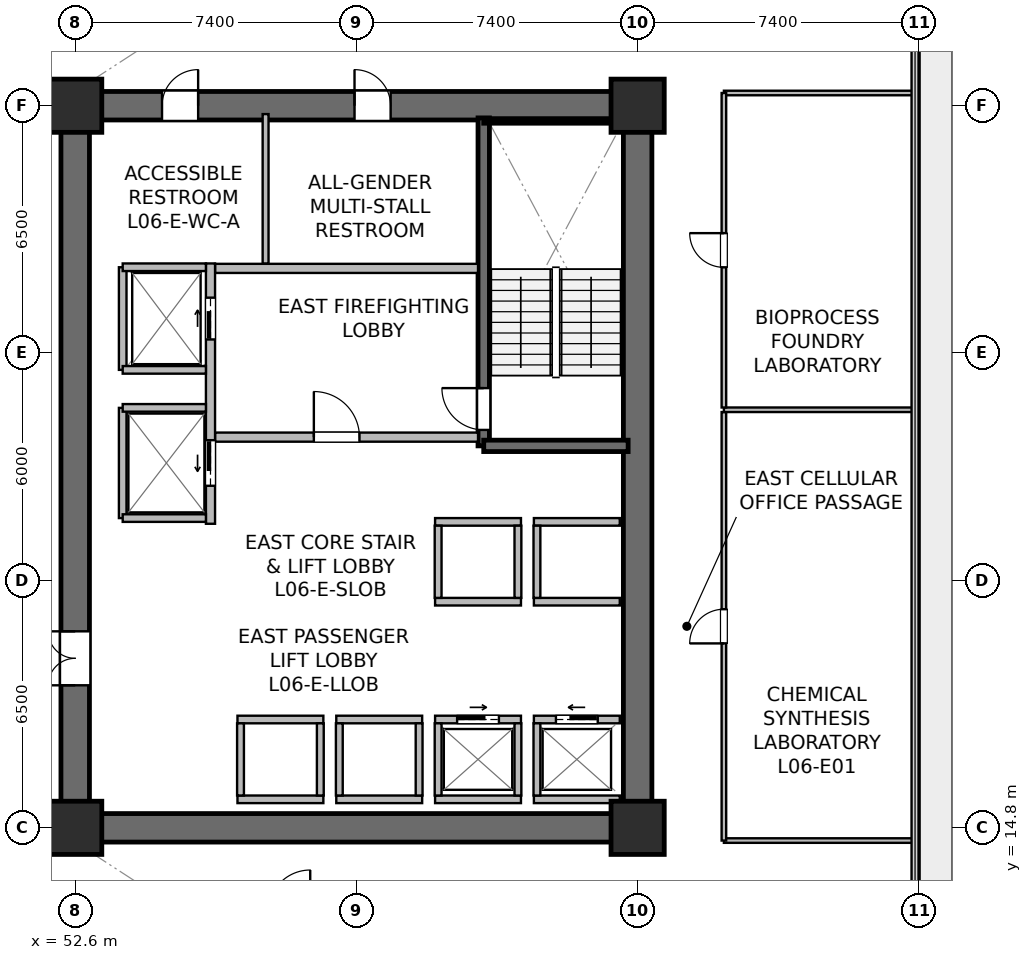
"""IFC4 building model, lengths in metres.
Left out: names, types, materials, properties, quantities, classifications, styles, units other than length and angle.
Written with IfcOpenShell. Run it as: python <this file> out.ifc"""

import sys

from ifc_helpers import new_model, si_unit, direction, frame, frame_2d, origin, origin_2d, place, context, subcontext, project, spatial, rectangle, extrude, source, transform, mapped, element, fill, save


model = new_model("IFC4")
c1 = context("Model", 3, precision=1e-05, world=origin(), true_north=direction((0.0, 1.0)))
c2 = subcontext(c1, "Body", "Model", "MODEL_VIEW")
j1 = project(units=[si_unit("LENGTHUNIT", "METRE"), si_unit("PLANEANGLEUNIT", "RADIAN")], contexts=[c1])
p1 = place(None, origin())
s1 = spatial("IfcSite", under=j1, at=p1, CompositionType="ELEMENT")
p2 = place(p1, origin())
s2 = spatial("IfcBuilding", under=s1, at=p2, CompositionType="ELEMENT")
p3 = place(p2, frame((0.0, 0.0, 25.2)))
s3 = spatial("IfcBuildingStorey", under=s2, at=p3, CompositionType="ELEMENT", Elevation=25.2)
p4 = place(p3, frame((52.225, 14.8, 0.0), z_axis=(0.0, 0.0, 1.0), x_axis=(1.0, 0.0, 0.0)))
e1 = element("IfcWall", 1, at=p4, inside=s3, PredefinedType="SHEAR", context=c2, shape_type="SweptSolid", body=[
    extrude(rectangle(XDim=15.55, YDim=0.75, at=frame_2d((7.775, 0.0))), origin(), (0.0, 0.0, 1.0), 3.78),
])
p5 = place(p3, frame((52.225, 33.8, 0.0), z_axis=(0.0, 0.0, 1.0), x_axis=(1.0, 0.0, 0.0)))
e2 = element("IfcWall", 2, at=p5, inside=s3, PredefinedType="SHEAR", context=c2, shape_type="SweptSolid", body=[
    extrude(rectangle(XDim=15.55, YDim=0.75, at=frame_2d((7.775, 0.0))), origin(), (0.0, 0.0, 1.0), 3.78),
])
p6 = place(p5, frame((7.725, 0.0, 0.0)))
e3 = element("IfcOpeningElement", 3, at=p6, cuts=e2, PredefinedType="OPENING", context=c2, shape_type="SweptSolid", body=[
    extrude(rectangle(XDim=0.95, YDim=2.15, at=frame_2d((0.475, 1.075))), frame((0.0, 0.385, 0.0), z_axis=(0.0, -1.0, 0.0), x_axis=(1.0, 0.0, 0.0)), (0.0, 0.0, 1.0), 0.77),
])
p7 = place(p5, frame((2.66, 0.0, 0.0)))
e4 = element("IfcOpeningElement", 4, at=p7, cuts=e2, PredefinedType="OPENING", context=c2, shape_type="SweptSolid", body=[
    extrude(rectangle(XDim=0.95, YDim=2.15, at=frame_2d((0.475, 1.075))), frame((0.0, 0.385, 0.0), z_axis=(0.0, -1.0, 0.0), x_axis=(1.0, 0.0, 0.0)), (0.0, 0.0, 1.0), 0.77),
])
p8 = place(p3, frame((52.6, 15.175, 0.0), z_axis=(0.0, 0.0, 1.0), x_axis=(0.0, 1.0, 0.0)))
e5 = element("IfcWall", 5, at=p8, inside=s3, PredefinedType="SHEAR", context=c2, shape_type="SweptSolid", body=[
    extrude(rectangle(XDim=18.25, YDim=0.75, at=frame_2d((9.125, 0.0))), origin(), (0.0, 0.0, 1.0), 3.78),
])
p9 = place(p8, frame((3.375, 0.0, 0.0)))
e6 = element("IfcOpeningElement", 6, at=p9, cuts=e5, PredefinedType="OPENING", context=c2, shape_type="SweptSolid", body=[
    extrude(rectangle(XDim=1.42, YDim=2.2, at=frame_2d((0.71, 1.1))), frame((0.0, 0.385, 0.0), z_axis=(0.0, -1.0, 0.0), x_axis=(1.0, 0.0, 0.0)), (0.0, 0.0, 1.0), 0.77),
])
p10 = place(p3, frame((67.4, 15.175, 0.0), z_axis=(0.0, 0.0, 1.0), x_axis=(0.0, 1.0, 0.0)))
e7 = element("IfcWall", 7, at=p10, inside=s3, PredefinedType="SHEAR", context=c2, shape_type="SweptSolid", body=[
    extrude(rectangle(XDim=18.25, YDim=0.75, at=frame_2d((9.125, 0.0))), origin(), (0.0, 0.0, 1.0), 3.78),
])
p11 = place(p3, frame((63.35, 24.85, 0.0), z_axis=(0.0, 0.0, 1.0), x_axis=(0.0, 1.0, 0.0)))
e8 = element("IfcWall", 8, at=p11, inside=s3, PredefinedType="SHEAR", context=c2, shape_type="SweptSolid", body=[
    extrude(rectangle(XDim=8.63, YDim=0.3, at=frame_2d((4.315, 0.0))), origin(), (0.0, 0.0, 1.0), 3.78),
])
p12 = place(p11, frame((0.42, 0.0, 0.0)))
e9 = element("IfcOpeningElement", 9, at=p12, cuts=e8, PredefinedType="OPENING", context=c2, shape_type="SweptSolid", body=[
    extrude(rectangle(XDim=1.1, YDim=2.15, at=frame_2d((0.55, 1.075))), frame((0.0, 0.16, 0.0), z_axis=(0.0, -1.0, 0.0), x_axis=(1.0, 0.0, 0.0)), (0.0, 0.0, 1.0), 0.32),
])
p13 = place(p3, frame((63.35, 24.85, 0.0), z_axis=(0.0, 0.0, 1.0), x_axis=(1.0, 0.0, 0.0)))
e10 = element("IfcWall", 10, at=p13, inside=s3, PredefinedType="SHEAR", context=c2, shape_type="SweptSolid", body=[
    extrude(rectangle(XDim=3.8, YDim=0.3, at=frame_2d((1.9, 0.0))), origin(), (0.0, 0.0, 1.0), 3.78),
])
p14 = place(p3, frame((63.35, 33.4, 0.0), z_axis=(0.0, 0.0, 1.0), x_axis=(1.0, 0.0, 0.0)))
e11 = element("IfcWall", 11, at=p14, inside=s3, PredefinedType="SOLIDWALL", context=c2, shape_type="SweptSolid", body=[
    extrude(rectangle(XDim=3.72, YDim=0.12, at=frame_2d((1.86, 0.0))), origin(), (0.0, 0.0, 1.0), 3.78),
])
m1 = source(origin(), c2, "Body", "SweptSolid", [
    extrude(rectangle(XDim=1.4, YDim=1.4, at=origin_2d()), origin(), (0.0, 0.0, 1.0), 4.1),
])
for number, where, z_axis, x_axis in (
    (12, (52.6, 14.8, 0.0), (0.0, 0.0, 1.0), (1.0, 0.0, 0.0)),
    (13, (67.4, 14.8, 0.0), (0.0, 0.0, 1.0), (1.0, 0.0, 0.0)),
    (14, (52.6, 33.8, 0.0), (0.0, 0.0, 1.0), (1.0, 0.0, 0.0)),
    (15, (67.4, 33.8, 0.0), (0.0, 0.0, 1.0), (1.0, 0.0, 0.0)),
):
    element("IfcColumn", number, at=place(p3, frame(where, z_axis=z_axis, x_axis=x_axis)), inside=s3, PredefinedType="COLUMN", context=c2, shape_type="MappedRepresentation", body=[
        mapped(m1, transform((0.0, 0.0, 0.0), scale=1.0)),
    ])
p15 = place(p3, frame((56.28, 25.08, 0.0), z_axis=(0.0, 0.0, 1.0), x_axis=(1.0, 0.0, 0.0)))
e16 = element("IfcWall", 16, at=p15, inside=s3, PredefinedType="SOLIDWALL", context=c2, shape_type="SweptSolid", body=[
    extrude(rectangle(XDim=6.92, YDim=0.24, at=frame_2d((3.46, 0.0))), origin(), (0.0, 0.0, 1.0), 3.065),
])
p16 = place(p15, frame((2.6, 0.0, 0.0)))
e17 = element("IfcOpeningElement", 17, at=p16, cuts=e16, PredefinedType="OPENING", context=c2, shape_type="SweptSolid", body=[
    extrude(rectangle(XDim=1.2, YDim=2.16, at=frame_2d((0.6, 1.08))), frame((0.0, 0.13, 0.0), z_axis=(0.0, -1.0, 0.0), x_axis=(1.0, 0.0, 0.0)), (0.0, 0.0, 1.0), 0.26),
])
p17 = place(p3, frame((56.28, 29.52, 0.0), z_axis=(0.0, 0.0, 1.0), x_axis=(1.0, 0.0, 0.0)))
e18 = element("IfcWall", 18, at=p17, inside=s3, PredefinedType="SOLIDWALL", context=c2, shape_type="SweptSolid", body=[
    extrude(rectangle(XDim=6.92, YDim=0.24, at=frame_2d((3.46, 0.0))), origin(), (0.0, 0.0, 1.0), 3.065),
])
p18 = place(p3, frame((56.16, 22.8, 0.0), z_axis=(0.0, 0.0, 1.0), x_axis=(0.0, 1.0, 0.0)))
e19 = element("IfcWall", 19, at=p18, inside=s3, PredefinedType="SOLIDWALL", context=c2, shape_type="SweptSolid", body=[
    extrude(rectangle(XDim=6.85, YDim=0.24, at=frame_2d((3.425, 0.0))), origin(), (0.0, 0.0, 1.0), 2.865),
])
p19 = place(p18, frame((4.85, 0.0, 0.0)))
e20 = element("IfcOpeningElement", 20, at=p19, cuts=e19, PredefinedType="OPENING", context=c2, shape_type="SweptSolid", body=[
    extrude(rectangle(XDim=1.1, YDim=2.22, at=frame_2d((0.55, 1.11))), frame((0.0, 0.13, 0.0), z_axis=(0.0, -1.0, 0.0), x_axis=(1.0, 0.0, 0.0)), (0.0, 0.0, 1.0), 0.26),
])
p20 = place(p18, frame((1.0, 0.0, 0.0)))
e21 = element("IfcOpeningElement", 21, at=p20, cuts=e19, PredefinedType="OPENING", context=c2, shape_type="SweptSolid", body=[
    extrude(rectangle(XDim=1.2, YDim=2.22, at=frame_2d((0.6, 1.11))), frame((0.0, 0.13, 0.0), z_axis=(0.0, -1.0, 0.0), x_axis=(1.0, 0.0, 0.0)), (0.0, 0.0, 1.0), 0.26),
])
p21 = place(p3, frame((64.67, 17.65, 0.0), z_axis=(0.0, 0.0, 1.0), x_axis=(1.0, 0.0, 0.0)))
e22 = element("IfcWall", 22, at=p21, inside=s3, PredefinedType="SOLIDWALL", context=c2, shape_type="SweptSolid", body=[
    extrude(rectangle(XDim=2.26, YDim=0.2, at=frame_2d((1.13, 0.0))), origin(), (0.0, 0.0, 1.0), 3.78),
])
p22 = place(p21, frame((0.58, 0.0, 0.0)))
e23 = element("IfcOpeningElement", 23, at=p22, cuts=e22, PredefinedType="OPENING", context=c2, shape_type="SweptSolid", body=[
    extrude(rectangle(XDim=1.1, YDim=2.22, at=frame_2d((0.55, 1.11))), frame((0.0, 0.11, 0.0), z_axis=(0.0, -1.0, 0.0), x_axis=(1.0, 0.0, 0.0)), (0.0, 0.0, 1.0), 0.22),
])
p23 = place(p3, frame((64.67, 15.55, 0.0), z_axis=(0.0, 0.0, 1.0), x_axis=(1.0, 0.0, 0.0)))
e24 = element("IfcWall", 24, at=p23, inside=s3, PredefinedType="SOLIDWALL", context=c2, shape_type="SweptSolid", body=[
    extrude(rectangle(XDim=2.26, YDim=0.2, at=frame_2d((1.13, 0.0))), origin(), (0.0, 0.0, 1.0), 3.78),
])
p24 = place(p3, frame((64.75, 15.65, 0.0), z_axis=(0.0, 0.0, 1.0), x_axis=(0.0, 1.0, 0.0)))
e25 = element("IfcWall", 25, at=p24, inside=s3, PredefinedType="SOLIDWALL", context=c2, shape_type="SweptSolid", body=[
    extrude(rectangle(XDim=1.9, YDim=0.18, at=frame_2d((0.95, 0.0))), origin(), (0.0, 0.0, 1.0), 3.78),
])
p25 = place(p3, frame((62.07, 17.65, 0.0), z_axis=(0.0, 0.0, 1.0), x_axis=(1.0, 0.0, 0.0)))
e26 = element("IfcWall", 26, at=p25, inside=s3, PredefinedType="SOLIDWALL", context=c2, shape_type="SweptSolid", body=[
    extrude(rectangle(XDim=2.26, YDim=0.2, at=frame_2d((1.13, 0.0))), origin(), (0.0, 0.0, 1.0), 3.78),
])
p26 = place(p25, frame((0.58, 0.0, 0.0)))
e27 = element("IfcOpeningElement", 27, at=p26, cuts=e26, PredefinedType="OPENING", context=c2, shape_type="SweptSolid", body=[
    extrude(rectangle(XDim=1.1, YDim=2.22, at=frame_2d((0.55, 1.11))), frame((0.0, 0.11, 0.0), z_axis=(0.0, -1.0, 0.0), x_axis=(1.0, 0.0, 0.0)), (0.0, 0.0, 1.0), 0.22),
])
p27 = place(p3, frame((62.07, 15.55, 0.0), z_axis=(0.0, 0.0, 1.0), x_axis=(1.0, 0.0, 0.0)))
e28 = element("IfcWall", 28, at=p27, inside=s3, PredefinedType="SOLIDWALL", context=c2, shape_type="SweptSolid", body=[
    extrude(rectangle(XDim=2.26, YDim=0.2, at=frame_2d((1.13, 0.0))), origin(), (0.0, 0.0, 1.0), 3.78),
])
for number, where, z_axis, x_axis in (
    (29, (62.15, 15.65, 0.0), (0.0, 0.0, 1.0), (0.0, 1.0, 0.0)),
    (30, (64.25, 15.65, 0.0), (0.0, 0.0, 1.0), (0.0, 1.0, 0.0)),
):
    element("IfcWall", number, at=place(p3, frame(where, z_axis=z_axis, x_axis=x_axis)), inside=s3, PredefinedType="SOLIDWALL", context=c2, shape_type="SweptSolid", body=[
        extrude(rectangle(XDim=1.9, YDim=0.18, at=frame_2d((0.95, 0.0))), origin(), (0.0, 0.0, 1.0), 3.78),
    ])
for number, where, z_axis, x_axis in (
    (31, (59.47, 17.65, 0.0), (0.0, 0.0, 1.0), (1.0, 0.0, 0.0)),
    (32, (59.47, 15.55, 0.0), (0.0, 0.0, 1.0), (1.0, 0.0, 0.0)),
):
    element("IfcWall", number, at=place(p3, frame(where, z_axis=z_axis, x_axis=x_axis)), inside=s3, PredefinedType="SOLIDWALL", context=c2, shape_type="SweptSolid", body=[
        extrude(rectangle(XDim=2.26, YDim=0.2, at=frame_2d((1.13, 0.0))), origin(), (0.0, 0.0, 1.0), 3.065),
    ])
for number, where, z_axis, x_axis in (
    (33, (59.55, 15.65, 0.0), (0.0, 0.0, 1.0), (0.0, 1.0, 0.0)),
    (34, (61.65, 15.65, 0.0), (0.0, 0.0, 1.0), (0.0, 1.0, 0.0)),
):
    element("IfcWall", number, at=place(p3, frame(where, z_axis=z_axis, x_axis=x_axis)), inside=s3, PredefinedType="SOLIDWALL", context=c2, shape_type="SweptSolid", body=[
        extrude(rectangle(XDim=1.9, YDim=0.18, at=frame_2d((0.95, 0.0))), origin(), (0.0, 0.0, 1.0), 3.78),
    ])
for number, where, z_axis, x_axis in (
    (35, (56.87, 17.65, 0.0), (0.0, 0.0, 1.0), (1.0, 0.0, 0.0)),
    (36, (56.87, 15.55, 0.0), (0.0, 0.0, 1.0), (1.0, 0.0, 0.0)),
):
    element("IfcWall", number, at=place(p3, frame(where, z_axis=z_axis, x_axis=x_axis)), inside=s3, PredefinedType="SOLIDWALL", context=c2, shape_type="SweptSolid", body=[
        extrude(rectangle(XDim=2.26, YDim=0.2, at=frame_2d((1.13, 0.0))), origin(), (0.0, 0.0, 1.0), 3.78),
    ])
for number, where, z_axis, x_axis in (
    (37, (56.95, 15.65, 0.0), (0.0, 0.0, 1.0), (0.0, 1.0, 0.0)),
    (38, (59.05, 15.65, 0.0), (0.0, 0.0, 1.0), (0.0, 1.0, 0.0)),
):
    element("IfcWall", number, at=place(p3, frame(where, z_axis=z_axis, x_axis=x_axis)), inside=s3, PredefinedType="SOLIDWALL", context=c2, shape_type="SweptSolid", body=[
        extrude(rectangle(XDim=1.9, YDim=0.18, at=frame_2d((0.95, 0.0))), origin(), (0.0, 0.0, 1.0), 3.78),
    ])
for number, where, z_axis, x_axis in (
    (39, (64.67, 20.75, 0.0), (0.0, 0.0, 1.0), (1.0, 0.0, 0.0)),
    (40, (64.67, 22.85, 0.0), (0.0, 0.0, 1.0), (1.0, 0.0, 0.0)),
):
    element("IfcWall", number, at=place(p3, frame(where, z_axis=z_axis, x_axis=x_axis)), inside=s3, PredefinedType="SOLIDWALL", context=c2, shape_type="SweptSolid", body=[
        extrude(rectangle(XDim=2.26, YDim=0.2, at=frame_2d((1.13, 0.0))), origin(), (0.0, 0.0, 1.0), 3.78),
    ])
p28 = place(p3, frame((64.75, 20.85, 0.0), z_axis=(0.0, 0.0, 1.0), x_axis=(0.0, 1.0, 0.0)))
e41 = element("IfcWall", 41, at=p28, inside=s3, PredefinedType="SOLIDWALL", context=c2, shape_type="SweptSolid", body=[
    extrude(rectangle(XDim=1.9, YDim=0.18, at=frame_2d((0.95, 0.0))), origin(), (0.0, 0.0, 1.0), 3.78),
])
for number, where, z_axis, x_axis in (
    (42, (62.07, 20.75, 0.0), (0.0, 0.0, 1.0), (1.0, 0.0, 0.0)),
    (43, (62.07, 22.85, 0.0), (0.0, 0.0, 1.0), (1.0, 0.0, 0.0)),
):
    element("IfcWall", number, at=place(p3, frame(where, z_axis=z_axis, x_axis=x_axis)), inside=s3, PredefinedType="SOLIDWALL", context=c2, shape_type="SweptSolid", body=[
        extrude(rectangle(XDim=2.26, YDim=0.2, at=frame_2d((1.13, 0.0))), origin(), (0.0, 0.0, 1.0), 3.78),
    ])
for number, where, z_axis, x_axis in (
    (44, (62.15, 20.85, 0.0), (0.0, 0.0, 1.0), (0.0, 1.0, 0.0)),
    (45, (64.25, 20.85, 0.0), (0.0, 0.0, 1.0), (0.0, 1.0, 0.0)),
):
    element("IfcWall", number, at=place(p3, frame(where, z_axis=z_axis, x_axis=x_axis)), inside=s3, PredefinedType="SOLIDWALL", context=c2, shape_type="SweptSolid", body=[
        extrude(rectangle(XDim=1.9, YDim=0.18, at=frame_2d((0.95, 0.0))), origin(), (0.0, 0.0, 1.0), 3.78),
    ])
p29 = place(p3, frame((53.85, 26.85, 0.0), z_axis=(0.0, 0.0, 1.0), x_axis=(0.0, 1.0, 0.0)))
e46 = element("IfcWall", 46, at=p29, inside=s3, PredefinedType="SOLIDWALL", context=c2, shape_type="SweptSolid", body=[
    extrude(rectangle(XDim=2.7, YDim=0.2, at=frame_2d((1.35, 0.0))), origin(), (0.0, 0.0, 1.0), 3.78),
])
p30 = place(p3, frame((53.85, 29.55, 0.0), z_axis=(0.0, 0.0, 1.0), x_axis=(1.0, 0.0, 0.0)))
e47 = element("IfcWall", 47, at=p30, inside=s3, PredefinedType="SOLIDWALL", context=c2, shape_type="SweptSolid", body=[
    extrude(rectangle(XDim=2.19, YDim=0.2, at=frame_2d((1.095, 0.0))), origin(), (0.0, 0.0, 1.0), 3.78),
])
p31 = place(p3, frame((53.85, 26.85, 0.0), z_axis=(0.0, 0.0, 1.0), x_axis=(1.0, 0.0, 0.0)))
e48 = element("IfcWall", 48, at=p31, inside=s3, PredefinedType="SOLIDWALL", context=c2, shape_type="SweptSolid", body=[
    extrude(rectangle(XDim=2.19, YDim=0.2, at=frame_2d((1.095, 0.0))), origin(), (0.0, 0.0, 1.0), 3.177),
])
p32 = place(p3, frame((53.85, 22.95, 0.0), z_axis=(0.0, 0.0, 1.0), x_axis=(0.0, 1.0, 0.0)))
e49 = element("IfcWall", 49, at=p32, inside=s3, PredefinedType="SOLIDWALL", context=c2, shape_type="SweptSolid", body=[
    extrude(rectangle(XDim=2.9, YDim=0.2, at=frame_2d((1.45, 0.0))), origin(), (0.0, 0.0, 1.0), 2.865),
])
for number, where, z_axis, x_axis in (
    (50, (53.85, 25.85, 0.0), (0.0, 0.0, 1.0), (1.0, 0.0, 0.0)),
    (51, (53.85, 22.95, 0.0), (0.0, 0.0, 1.0), (1.0, 0.0, 0.0)),
):
    element("IfcWall", number, at=place(p3, frame(where, z_axis=z_axis, x_axis=x_axis)), inside=s3, PredefinedType="SOLIDWALL", context=c2, shape_type="SweptSolid", body=[
        extrude(rectangle(XDim=2.19, YDim=0.2, at=frame_2d((1.095, 0.0))), origin(), (0.0, 0.0, 1.0), 3.78),
    ])
p33 = place(p3, frame((57.61, 29.65, 0.0), z_axis=(0.0, 0.0, 1.0), x_axis=(0.0, 1.0, 0.0)))
e52 = element("IfcWall", 52, at=p33, inside=s3, PredefinedType="PLUMBINGWALL", context=c2, shape_type="SweptSolid", body=[
    extrude(rectangle(XDim=3.93, YDim=0.155, at=frame_2d((1.965, 0.0))), origin(), (0.0, 0.0, 1.0), 3.78),
])
for number, where, z_axis, x_axis in (
    (53, (69.67, 14.465, 0.0), (0.0, 0.0, 1.0), (1.0, 0.0, 0.0)),
    (54, (69.67, 34.135, 0.0), (0.0, 0.0, 1.0), (1.0, 0.0, 0.0)),
):
    element("IfcWall", number, at=place(p3, frame(where, z_axis=z_axis, x_axis=x_axis)), inside=s3, PredefinedType="PARTITIONING", context=c2, shape_type="SweptSolid", body=[
        extrude(rectangle(XDim=5.02, YDim=0.12, at=frame_2d((2.51, 0.0))), origin(), (0.0, 0.0, 1.0), 3.78),
    ])
p34 = place(p3, frame((69.67, 14.465, 0.0), z_axis=(0.0, 0.0, 1.0), x_axis=(0.0, 1.0, 0.0)))
e55 = element("IfcWall", 55, at=p34, inside=s3, PredefinedType="PARTITIONING", context=c2, shape_type="SweptSolid", body=[
    extrude(rectangle(XDim=11.275, YDim=0.12, at=frame_2d((5.637, 0.0))), origin(), (0.0, 0.0, 1.0), 3.78),
])
p35 = place(p34, frame((5.188, 0.0, 0.0)))
e56 = element("IfcOpeningElement", 56, at=p35, cuts=e55, PredefinedType="OPENING", context=c2, shape_type="SweptSolid", body=[
    extrude(rectangle(XDim=0.9, YDim=2.1, at=frame_2d((0.45, 1.05))), frame((0.0, 0.07, 0.0), z_axis=(0.0, -1.0, 0.0), x_axis=(1.0, 0.0, 0.0)), (0.0, 0.0, 1.0), 0.14),
])
p36 = place(p3, frame((69.67, 25.8, 0.0), z_axis=(0.0, 0.0, 1.0), x_axis=(1.0, 0.0, 0.0)))
e57 = element("IfcWall", 57, at=p36, inside=s3, PredefinedType="PARTITIONING", context=c2, shape_type="SweptSolid", body=[
    extrude(rectangle(XDim=5.02, YDim=0.12, at=frame_2d((2.51, 0.0))), origin(), (0.0, 0.0, 1.0), 3.78),
])
p37 = place(p3, frame((69.67, 25.86, 0.0), z_axis=(0.0, 0.0, 1.0), x_axis=(0.0, 1.0, 0.0)))
e58 = element("IfcWall", 58, at=p37, inside=s3, PredefinedType="PARTITIONING", context=c2, shape_type="SweptSolid", body=[
    extrude(rectangle(XDim=8.275, YDim=0.12, at=frame_2d((4.137, 0.0))), origin(), (0.0, 0.0, 1.0), 3.78),
])
p38 = place(p37, frame((3.688, 0.0, 0.0)))
e59 = element("IfcOpeningElement", 59, at=p38, cuts=e58, PredefinedType="OPENING", context=c2, shape_type="SweptSolid", body=[
    extrude(rectangle(XDim=0.9, YDim=2.1, at=frame_2d((0.45, 1.05))), frame((0.0, 0.07, 0.0), z_axis=(0.0, -1.0, 0.0), x_axis=(1.0, 0.0, 0.0)), (0.0, 0.0, 1.0), 0.14),
])
m2 = source(origin(), c2, "Body", "SweptSolid", [
    extrude(rectangle(XDim=1.1, YDim=2.15, at=frame_2d((0.55, 1.075))), frame((0.0, 0.025, 0.0), z_axis=(0.0, -1.0, 0.0), x_axis=(1.0, 0.0, 0.0)), (0.0, 0.0, 1.0), 0.05),
])
p39 = place(p12, origin())
e60 = element("IfcDoor", 60, at=p39, inside=s3, OperationType="SINGLE_SWING_RIGHT", PredefinedType="DOOR", context=c2, shape_type="MappedRepresentation", body=[
    mapped(m2, transform((0.0, 0.0, 0.0), scale=1.0)),
])
fill(e9, e60)
m3 = source(origin(), c2, "Body", "SweptSolid", [
    extrude(rectangle(XDim=1.2, YDim=2.16, at=frame_2d((0.6, 1.08))), frame((0.0, 0.025, 0.0), z_axis=(0.0, -1.0, 0.0), x_axis=(1.0, 0.0, 0.0)), (0.0, 0.0, 1.0), 0.05),
])
p40 = place(p16, origin())
e61 = element("IfcDoor", 61, at=p40, inside=s3, OperationType="SINGLE_SWING_LEFT", PredefinedType="DOOR", context=c2, shape_type="MappedRepresentation", body=[
    mapped(m3, transform((0.0, 0.0, 0.0), scale=1.0)),
])
fill(e17, e61)
m4 = source(origin(), c2, "Body", "SweptSolid", [
    extrude(rectangle(XDim=1.1, YDim=2.22, at=frame_2d((0.55, 1.11))), frame((0.0, 0.025, 0.0), z_axis=(0.0, -1.0, 0.0), x_axis=(1.0, 0.0, 0.0)), (0.0, 0.0, 1.0), 0.05),
])
p41 = place(p22, origin())
e62 = element("IfcDoor", 62, at=p41, inside=s3, OperationType="SLIDING_TO_LEFT", PredefinedType="USERDEFINED", context=c2, shape_type="MappedRepresentation", body=[
    mapped(m4, transform((0.0, 0.0, 0.0), scale=1.0)),
])
fill(e23, e62)
p42 = place(p26, origin())
e63 = element("IfcDoor", 63, at=p42, inside=s3, OperationType="SLIDING_TO_RIGHT", PredefinedType="USERDEFINED", context=c2, shape_type="MappedRepresentation", body=[
    mapped(m4, transform((0.0, 0.0, 0.0), scale=1.0)),
])
fill(e27, e63)
p43 = place(p19, origin())
e64 = element("IfcDoor", 64, at=p43, inside=s3, OperationType="SLIDING_TO_RIGHT", PredefinedType="USERDEFINED", context=c2, shape_type="MappedRepresentation", body=[
    mapped(m4, transform((0.0, 0.0, 0.0), scale=1.0)),
])
fill(e20, e64)
m5 = source(origin(), c2, "Body", "SweptSolid", [
    extrude(rectangle(XDim=1.2, YDim=2.22, at=frame_2d((0.6, 1.11))), frame((0.0, 0.025, 0.0), z_axis=(0.0, -1.0, 0.0), x_axis=(1.0, 0.0, 0.0)), (0.0, 0.0, 1.0), 0.05),
])
p44 = place(p20, origin())
e65 = element("IfcDoor", 65, at=p44, inside=s3, OperationType="SLIDING_TO_LEFT", PredefinedType="USERDEFINED", context=c2, shape_type="MappedRepresentation", body=[
    mapped(m5, transform((0.0, 0.0, 0.0), scale=1.0)),
])
fill(e21, e65)
m6 = source(origin(), c2, "Body", "SweptSolid", [
    extrude(rectangle(XDim=1.42, YDim=2.2, at=frame_2d((0.71, 1.1))), frame((0.0, 0.025, 0.0), z_axis=(0.0, -1.0, 0.0), x_axis=(1.0, 0.0, 0.0)), (0.0, 0.0, 1.0), 0.05),
])
p45 = place(p9, origin())
e66 = element("IfcDoor", 66, at=p45, inside=s3, OperationType="DOUBLE_DOOR_SINGLE_SWING", PredefinedType="DOOR", context=c2, shape_type="MappedRepresentation", body=[
    mapped(m6, transform((0.0, 0.0, 0.0), scale=1.0)),
])
fill(e6, e66)
m7 = source(origin(), c2, "Body", "SweptSolid", [
    extrude(rectangle(XDim=0.95, YDim=2.15, at=frame_2d((0.475, 1.075))), frame((0.0, 0.025, 0.0), z_axis=(0.0, -1.0, 0.0), x_axis=(1.0, 0.0, 0.0)), (0.0, 0.0, 1.0), 0.05),
])
p46 = place(p6, origin())
e67 = element("IfcDoor", 67, at=p46, inside=s3, OperationType="SINGLE_SWING_LEFT", PredefinedType="DOOR", context=c2, shape_type="MappedRepresentation", body=[
    mapped(m7, transform((0.0, 0.0, 0.0), scale=1.0)),
])
fill(e3, e67)
p47 = place(p7, origin())
e68 = element("IfcDoor", 68, at=p47, inside=s3, OperationType="SINGLE_SWING_RIGHT", PredefinedType="DOOR", context=c2, shape_type="MappedRepresentation", body=[
    mapped(m7, transform((0.0, 0.0, 0.0), scale=1.0)),
])
fill(e4, e68)
m8 = source(origin(), c2, "Body", "SweptSolid", [
    extrude(rectangle(XDim=0.9, YDim=2.1, at=frame_2d((0.45, 1.05))), frame((0.0, 0.025, 0.0), z_axis=(0.0, -1.0, 0.0), x_axis=(1.0, 0.0, 0.0)), (0.0, 0.0, 1.0), 0.05),
])
p48 = place(p35, origin())
e69 = element("IfcDoor", 69, at=p48, inside=s3, OperationType="SINGLE_SWING_LEFT", PredefinedType="DOOR", context=c2, shape_type="MappedRepresentation", body=[
    mapped(m8, transform((0.0, 0.0, 0.0), scale=1.0)),
])
fill(e56, e69)
p49 = place(p38, origin())
e70 = element("IfcDoor", 70, at=p49, inside=s3, OperationType="SINGLE_SWING_RIGHT", PredefinedType="DOOR", context=c2, shape_type="MappedRepresentation", body=[
    mapped(m8, transform((0.0, 0.0, 0.0), scale=1.0)),
])
fill(e59, e70)
save(model, sys.argv[1])
